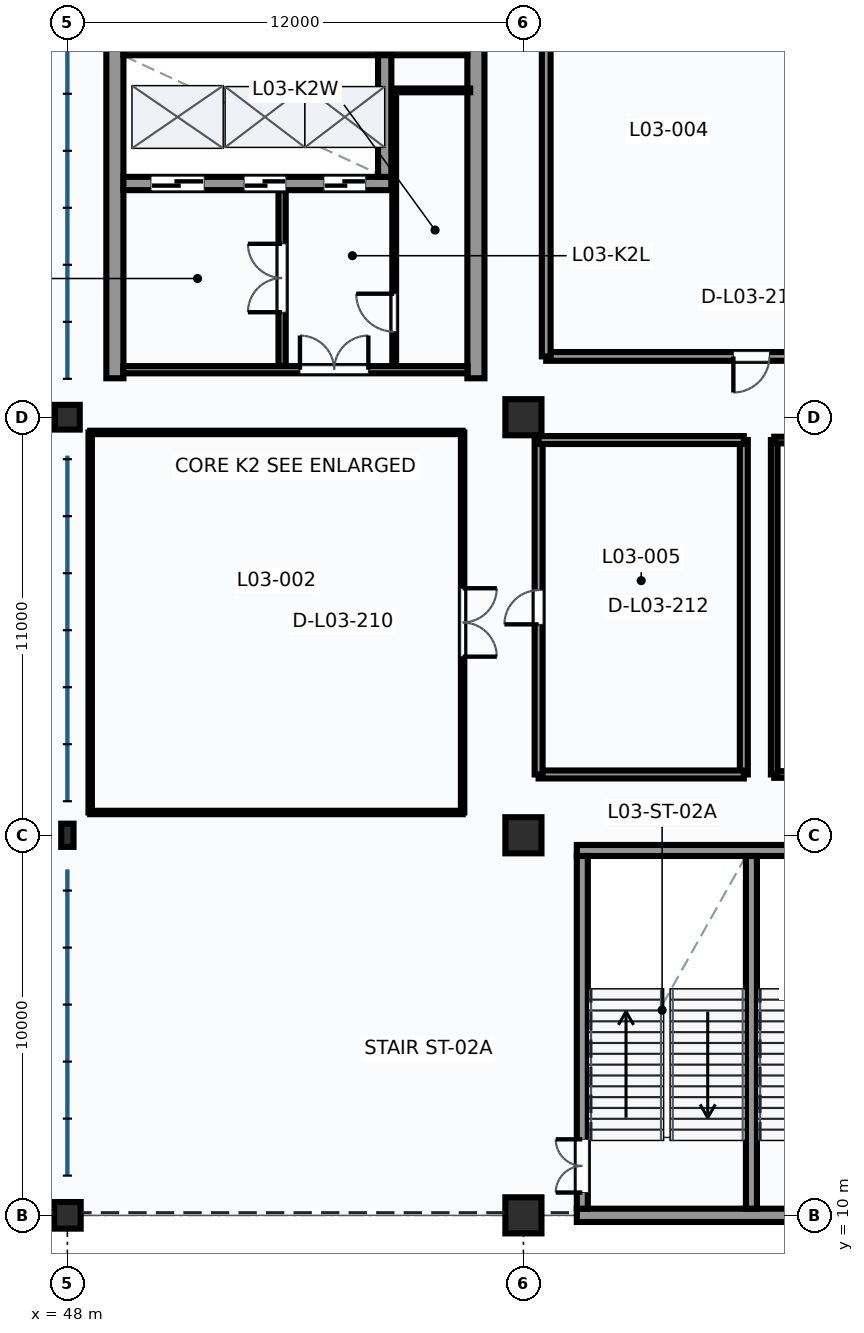
"""IFC4 building model, lengths in metres.
Left out: names, types, materials, properties, quantities, classifications, styles, units other than length and angle.
Written with IfcOpenShell. Run it as: python <this file> out.ifc"""

import sys

from ifc_helpers import new_model, si_unit, direction, frame, frame_2d, origin, origin_2d, place, context, subcontext, project, spatial, rectangle, i_section, extrude, element, fill, save


model = new_model("IFC4")
c1 = context("Model", 3, precision=1e-05, world=origin(), true_north=direction((0.0, 1.0)))
c2 = subcontext(c1, "Body", "Model", "MODEL_VIEW")
j1 = project(units=[si_unit("LENGTHUNIT", "METRE"), si_unit("PLANEANGLEUNIT", "RADIAN")], contexts=[c1])
p1 = place(None, origin())
s1 = spatial("IfcSite", under=j1, at=p1, CompositionType="ELEMENT")
p2 = place(p1, origin())
s2 = spatial("IfcBuilding", under=s1, at=p2, CompositionType="ELEMENT")
p3 = place(p2, frame((0.0, 0.0, 14.7)))
s3 = spatial("IfcBuildingStorey", under=s2, at=p3, CompositionType="ELEMENT", Elevation=14.7)
p4 = place(p3, frame((48.0, 10.0, 0.0), z_axis=(0.0, 0.0, 1.0), x_axis=(1.0, 0.0, 0.0)))
e1 = element("IfcColumn", 1, at=p4, inside=s3, PredefinedType="COLUMN", context=c2, shape_type="SweptSolid", body=[
    extrude(rectangle(XDim=0.7, YDim=0.7, at=origin_2d()), origin(), (0.0, 0.0, 1.0), 4.5),
])
p5 = place(p3, frame((48.0, 20.0, 0.0), z_axis=(0.0, 0.0, 1.0), x_axis=(1.0, 0.0, 0.0)))
e2 = element("IfcColumn", 2, at=p5, inside=s3, PredefinedType="COLUMN", context=c2, shape_type="SweptSolid", body=[
    extrude(i_section(OverallWidth=0.324, OverallDepth=0.611, WebThickness=0.013, FlangeThickness=0.019, FilletRadius=0.016, at=origin_2d()), origin(), (0.0, 0.0, 1.0), 4.5),
])
p6 = place(p3, frame((48.0, 31.0, 0.0), z_axis=(0.0, 0.0, 1.0), x_axis=(1.0, 0.0, 0.0)))
e3 = element("IfcColumn", 3, at=p6, inside=s3, PredefinedType="COLUMN", context=c2, shape_type="SweptSolid", body=[
    extrude(rectangle(XDim=0.65, YDim=0.65, at=origin_2d()), origin(), (0.0, 0.0, 1.0), 4.5),
])
for number, where, z_axis, x_axis in (
    (4, (60.0, 10.0, 0.0), (0.0, 0.0, 1.0), (1.0, 0.0, 0.0)),
    (5, (60.0, 20.0, 0.0), (0.0, 0.0, 1.0), (1.0, 0.0, 0.0)),
    (6, (60.0, 31.0, 0.0), (0.0, 0.0, 1.0), (1.0, 0.0, 0.0)),
):
    element("IfcColumn", number, at=place(p3, frame(where, z_axis=z_axis, x_axis=x_axis)), inside=s3, PredefinedType="COLUMN", context=c2, shape_type="SweptSolid", body=[
        extrude(rectangle(XDim=0.95, YDim=0.95, at=origin_2d()), origin(), (0.0, 0.0, 1.0), 4.5),
    ])
p7 = place(p3, frame((61.405, 10.0, 0.0), z_axis=(0.0, 0.0, 1.0), x_axis=(1.0, 0.0, 0.0)))
e7 = element("IfcWall", 7, at=p7, inside=s3, PredefinedType="SHEAR", context=c2, shape_type="SweptSolid", body=[
    extrude(rectangle(XDim=9.19, YDim=0.35, at=frame_2d((4.595, 0.0))), origin(), (0.0, 0.0, 1.0), 3.447),
])
p8 = place(p3, frame((61.405, 19.6, 0.0), z_axis=(0.0, 0.0, 1.0), x_axis=(1.0, 0.0, 0.0)))
e8 = element("IfcWall", 8, at=p8, inside=s3, PredefinedType="SHEAR", context=c2, shape_type="SweptSolid", body=[
    extrude(rectangle(XDim=9.19, YDim=0.29, at=frame_2d((4.595, 0.0))), origin(), (0.0, 0.0, 1.0), 4.5),
])
p9 = place(p3, frame((61.55, 10.175, 0.0), z_axis=(0.0, 0.0, 1.0), x_axis=(0.0, 1.0, 0.0)))
e9 = element("IfcWall", 9, at=p9, inside=s3, PredefinedType="SHEAR", context=c2, shape_type="SweptSolid", body=[
    extrude(rectangle(XDim=9.28, YDim=0.29, at=frame_2d((4.64, 0.0))), origin(), (0.0, 0.0, 1.0), 4.5),
])
p10 = place(p9, frame((0.425, 0.0, 0.0)))
e10 = element("IfcOpeningElement", 10, at=p10, cuts=e9, PredefinedType="OPENING", context=c2, shape_type="SweptSolid", body=[
    extrude(rectangle(XDim=1.4, YDim=2.2, at=frame_2d((0.7, 1.1))), frame((0.0, 0.155, 0.0), z_axis=(0.0, -1.0, 0.0), x_axis=(1.0, 0.0, 0.0)), (0.0, 0.0, 1.0), 0.31),
])
p11 = place(p3, frame((66.0, 10.175, 0.0), z_axis=(0.0, 0.0, 1.0), x_axis=(0.0, 1.0, 0.0)))
e11 = element("IfcWall", 11, at=p11, inside=s3, PredefinedType="SHEAR", context=c2, shape_type="SweptSolid", body=[
    extrude(rectangle(XDim=9.28, YDim=0.29, at=frame_2d((4.64, 0.0))), origin(), (0.0, 0.0, 1.0), 4.5),
])
for number, where, z_axis, x_axis in (
    (12, (49.25, 32.025, 0.0), (0.0, 0.0, 1.0), (0.0, 1.0, 0.0)),
    (13, (58.75, 32.025, 0.0), (0.0, 0.0, 1.0), (0.0, 1.0, 0.0)),
):
    element("IfcWall", number, at=place(p3, frame(where, z_axis=z_axis, x_axis=x_axis)), inside=s3, PredefinedType="SHEAR", context=c2, shape_type="SweptSolid", body=[
        extrude(rectangle(XDim=8.95, YDim=0.45, at=frame_2d((4.475, 0.0))), origin(), (0.0, 0.0, 1.0), 4.5),
    ])
p12 = place(p3, frame((49.475, 40.75, 0.0), z_axis=(0.0, 0.0, 1.0), x_axis=(1.0, 0.0, 0.0)))
e14 = element("IfcWall", 14, at=p12, inside=s3, PredefinedType="SHEAR", context=c2, shape_type="SweptSolid", body=[
    extrude(rectangle(XDim=9.05, YDim=0.45, at=frame_2d((4.525, 0.0))), origin(), (0.0, 0.0, 1.0), 4.5),
])
p13 = place(p3, frame((49.475, 37.15, 0.0), z_axis=(0.0, 0.0, 1.0), x_axis=(1.0, 0.0, 0.0)))
e15 = element("IfcWall", 15, at=p13, inside=s3, PredefinedType="SHEAR", context=c2, shape_type="SweptSolid", body=[
    extrude(rectangle(XDim=7.05, YDim=0.35, at=frame_2d((3.525, 0.0))), origin(), (0.0, 0.0, 1.0), 4.5),
])
p14 = place(p13, frame((0.725, 0.0, 0.0)))
e16 = element("IfcOpeningElement", 16, at=p14, cuts=e15, PredefinedType="OPENING", context=c2, shape_type="SweptSolid", body=[
    extrude(rectangle(XDim=1.4, YDim=2.3, at=frame_2d((0.7, 1.15))), frame((0.0, 0.185, 0.0), z_axis=(0.0, -1.0, 0.0), x_axis=(1.0, 0.0, 0.0)), (0.0, 0.0, 1.0), 0.37),
])
p15 = place(p13, frame((3.175, 0.0, 0.0)))
e17 = element("IfcOpeningElement", 17, at=p15, cuts=e15, PredefinedType="OPENING", context=c2, shape_type="SweptSolid", body=[
    extrude(rectangle(XDim=1.1, YDim=2.2, at=frame_2d((0.55, 1.1))), frame((0.0, 0.185, 0.0), z_axis=(0.0, -1.0, 0.0), x_axis=(1.0, 0.0, 0.0)), (0.0, 0.0, 1.0), 0.37),
])
p16 = place(p13, frame((5.275, 0.0, 0.0)))
e18 = element("IfcOpeningElement", 18, at=p16, cuts=e15, PredefinedType="OPENING", context=c2, shape_type="SweptSolid", body=[
    extrude(rectangle(XDim=1.1, YDim=2.2, at=frame_2d((0.55, 1.1))), frame((0.0, 0.185, 0.0), z_axis=(0.0, -1.0, 0.0), x_axis=(1.0, 0.0, 0.0)), (0.0, 0.0, 1.0), 0.37),
])
p17 = place(p3, frame((56.35, 37.325, 0.0), z_axis=(0.0, 0.0, 1.0), x_axis=(0.0, 1.0, 0.0)))
e19 = element("IfcWall", 19, at=p17, inside=s3, PredefinedType="SHEAR", context=c2, shape_type="SweptSolid", body=[
    extrude(rectangle(XDim=3.2, YDim=0.35, at=frame_2d((1.6, 0.0))), origin(), (0.0, 0.0, 1.0), 4.5),
])
p18 = place(p3, frame((49.47, 32.25, 0.0), z_axis=(0.0, 0.0, 1.0), x_axis=(1.0, 0.0, 0.0)))
e20 = element("IfcWall", 20, at=p18, inside=s3, PredefinedType="PARTITIONING", context=c2, shape_type="SweptSolid", body=[
    extrude(rectangle(XDim=9.06, YDim=0.19, at=frame_2d((4.53, 0.0))), origin(), (0.0, 0.0, 1.0), 4.16),
])
p19 = place(p18, frame((4.65, 0.0, 0.0)))
e21 = element("IfcOpeningElement", 21, at=p19, cuts=e20, PredefinedType="OPENING", context=c2, shape_type="SweptSolid", body=[
    extrude(rectangle(XDim=1.8, YDim=2.3, at=frame_2d((0.9, 1.15))), frame((0.0, 0.105, 0.0), z_axis=(0.0, -1.0, 0.0), x_axis=(1.0, 0.0, 0.0)), (0.0, 0.0, 1.0), 0.21),
])
p20 = place(p3, frame((53.65, 32.35, 0.0), z_axis=(0.0, 0.0, 1.0), x_axis=(0.0, 1.0, 0.0)))
e22 = element("IfcWall", 22, at=p20, inside=s3, PredefinedType="PARTITIONING", context=c2, shape_type="SweptSolid", body=[
    extrude(rectangle(XDim=4.625, YDim=0.19, at=frame_2d((2.312, 0.0))), origin(), (0.0, 0.0, 1.0), 4.16),
])
p21 = place(p20, frame((1.413, 0.0, 0.0)))
e23 = element("IfcOpeningElement", 23, at=p21, cuts=e22, PredefinedType="OPENING", context=c2, shape_type="SweptSolid", body=[
    extrude(rectangle(XDim=1.8, YDim=2.2, at=frame_2d((0.9, 1.1))), frame((0.0, 0.105, 0.0), z_axis=(0.0, -1.0, 0.0), x_axis=(1.0, 0.0, 0.0)), (0.0, 0.0, 1.0), 0.21),
])
p22 = place(p3, frame((56.6, 32.35, 0.0), z_axis=(0.0, 0.0, 1.0), x_axis=(0.0, 1.0, 0.0)))
e24 = element("IfcWall", 24, at=p22, inside=s3, PredefinedType="PARTITIONING", context=c2, shape_type="SweptSolid", body=[
    extrude(rectangle(XDim=7.25, YDim=0.1, at=frame_2d((3.625, 0.0))), origin(), (0.0, 0.0, 1.0), 4.16),
])
p23 = place(p22, frame((0.9, 0.0, 0.0)))
e25 = element("IfcOpeningElement", 25, at=p23, cuts=e24, PredefinedType="OPENING", context=c2, shape_type="SweptSolid", body=[
    extrude(rectangle(XDim=1.0, YDim=2.1, at=frame_2d((0.5, 1.05))), frame((0.0, 0.06, 0.0), z_axis=(0.0, -1.0, 0.0), x_axis=(1.0, 0.0, 0.0)), (0.0, 0.0, 1.0), 0.12),
])
p24 = place(p3, frame((56.6, 39.6, 0.0), z_axis=(0.0, 0.0, 1.0), x_axis=(1.0, 0.0, 0.0)))
e26 = element("IfcWall", 26, at=p24, inside=s3, PredefinedType="PARTITIONING", context=c2, shape_type="SweptSolid", body=[
    extrude(rectangle(XDim=2.0, YDim=0.1, at=frame_2d((1.0, 0.0))), origin(), (0.0, 0.0, 1.0), 4.16),
])
p25 = place(p3, frame((58.4, 30.6, 0.0), z_axis=(0.0, 0.0, 1.0), x_axis=(0.0, -1.0, 0.0)))
e27 = element("IfcWall", 27, at=p25, inside=s3, PredefinedType="PARTITIONING", context=c2, shape_type="SweptSolid", body=[
    extrude(rectangle(XDim=10.0, YDim=0.09, at=frame_2d((5.0, 0.0))), origin(), (0.0, 0.0, 1.0), 3.73),
])
p26 = place(p25, frame((4.1, 0.0, 0.0)))
e28 = element("IfcOpeningElement", 28, at=p26, cuts=e27, PredefinedType="OPENING", context=c2, shape_type="SweptSolid", body=[
    extrude(rectangle(XDim=1.8, YDim=2.3, at=frame_2d((0.9, 1.15))), frame((0.0, 0.055, 0.0), z_axis=(0.0, -1.0, 0.0), x_axis=(1.0, 0.0, 0.0)), (0.0, 0.0, 1.0), 0.11),
])
p27 = place(p3, frame((58.4, 20.6, 0.0), z_axis=(0.0, 0.0, 1.0), x_axis=(-1.0, 0.0, 0.0)))
e29 = element("IfcWall", 29, at=p27, inside=s3, PredefinedType="PARTITIONING", context=c2, shape_type="SweptSolid", body=[
    extrude(rectangle(XDim=9.8, YDim=0.09, at=frame_2d((4.9, 0.0))), origin(), (0.0, 0.0, 1.0), 4.16),
])
p28 = place(p3, frame((48.6, 20.6, 0.0), z_axis=(0.0, 0.0, 1.0), x_axis=(0.0, 1.0, 0.0)))
e30 = element("IfcWall", 30, at=p28, inside=s3, PredefinedType="PARTITIONING", context=c2, shape_type="SweptSolid", body=[
    extrude(rectangle(XDim=10.0, YDim=0.09, at=frame_2d((5.0, 0.0))), origin(), (0.0, 0.0, 1.0), 3.73),
])
p29 = place(p3, frame((48.6, 30.6, 0.0), z_axis=(0.0, 0.0, 1.0), x_axis=(1.0, 0.0, 0.0)))
e31 = element("IfcWall", 31, at=p29, inside=s3, PredefinedType="PARTITIONING", context=c2, shape_type="SweptSolid", body=[
    extrude(rectangle(XDim=9.8, YDim=0.09, at=frame_2d((4.9, 0.0))), origin(), (0.0, 0.0, 1.0), 4.16),
])
p30 = place(p3, frame((71.4, 32.6, 0.0), z_axis=(0.0, 0.0, 1.0), x_axis=(-1.0, 0.0, 0.0)))
e32 = element("IfcWall", 32, at=p30, inside=s3, PredefinedType="SOLIDWALL", context=c2, shape_type="SweptSolid", body=[
    extrude(rectangle(XDim=10.8, YDim=0.23, at=frame_2d((5.4, 0.0))), origin(), (0.0, 0.0, 1.0), 4.16),
])
p31 = place(p30, frame((4.925, 0.0, 0.0)))
e33 = element("IfcOpeningElement", 33, at=p31, cuts=e32, PredefinedType="OPENING", context=c2, shape_type="SweptSolid", body=[
    extrude(rectangle(XDim=0.95, YDim=2.15, at=frame_2d((0.475, 1.075))), frame((0.0, 0.125, 0.0), z_axis=(0.0, -1.0, 0.0), x_axis=(1.0, 0.0, 0.0)), (0.0, 0.0, 1.0), 0.25),
])
p32 = place(p3, frame((60.6, 32.6, 0.0), z_axis=(0.0, 0.0, 1.0), x_axis=(0.0, 1.0, 0.0)))
e34 = element("IfcWall", 34, at=p32, inside=s3, PredefinedType="SOLIDWALL", context=c2, shape_type="SweptSolid", body=[
    extrude(rectangle(XDim=8.8, YDim=0.23, at=frame_2d((4.4, 0.0))), origin(), (0.0, 0.0, 1.0), 4.16),
])
p33 = place(p3, frame((65.8, 30.4, 0.0), z_axis=(0.0, 0.0, 1.0), x_axis=(0.0, -1.0, 0.0)))
e35 = element("IfcWall", 35, at=p33, inside=s3, PredefinedType="SOLIDWALL", context=c2, shape_type="SweptSolid", body=[
    extrude(rectangle(XDim=8.8, YDim=0.21, at=frame_2d((4.4, 0.0))), origin(), (0.0, 0.0, 1.0), 3.83),
])
p34 = place(p3, frame((65.8, 21.6, 0.0), z_axis=(0.0, 0.0, 1.0), x_axis=(-1.0, 0.0, 0.0)))
e36 = element("IfcWall", 36, at=p34, inside=s3, PredefinedType="SOLIDWALL", context=c2, shape_type="SweptSolid", body=[
    extrude(rectangle(XDim=5.4, YDim=0.21, at=frame_2d((2.7, 0.0))), origin(), (0.0, 0.0, 1.0), 4.16),
])
p35 = place(p3, frame((60.4, 21.6, 0.0), z_axis=(0.0, 0.0, 1.0), x_axis=(0.0, 1.0, 0.0)))
e37 = element("IfcWall", 37, at=p35, inside=s3, PredefinedType="SOLIDWALL", context=c2, shape_type="SweptSolid", body=[
    extrude(rectangle(XDim=8.8, YDim=0.21, at=frame_2d((4.4, 0.0))), origin(), (0.0, 0.0, 1.0), 3.83),
])
p36 = place(p35, frame((3.95, 0.0, 0.0)))
e38 = element("IfcOpeningElement", 38, at=p36, cuts=e37, PredefinedType="OPENING", context=c2, shape_type="SweptSolid", body=[
    extrude(rectangle(XDim=0.9, YDim=2.1, at=frame_2d((0.45, 1.05))), frame((0.0, 0.115, 0.0), z_axis=(0.0, -1.0, 0.0), x_axis=(1.0, 0.0, 0.0)), (0.0, 0.0, 1.0), 0.23),
])
p37 = place(p3, frame((60.4, 30.4, 0.0), z_axis=(0.0, 0.0, 1.0), x_axis=(1.0, 0.0, 0.0)))
e39 = element("IfcWall", 39, at=p37, inside=s3, PredefinedType="SOLIDWALL", context=c2, shape_type="SweptSolid", body=[
    extrude(rectangle(XDim=5.4, YDim=0.21, at=frame_2d((2.7, 0.0))), origin(), (0.0, 0.0, 1.0), 4.16),
])
p38 = place(p3, frame((72.0, 21.6, 0.0), z_axis=(0.0, 0.0, 1.0), x_axis=(-1.0, 0.0, 0.0)))
e40 = element("IfcWall", 40, at=p38, inside=s3, PredefinedType="PARTITIONING", context=c2, shape_type="SweptSolid", body=[
    extrude(rectangle(XDim=5.4, YDim=0.175, at=frame_2d((2.7, 0.0))), origin(), (0.0, 0.0, 1.0), 3.37),
])
p39 = place(p3, frame((66.6, 21.6, 0.0), z_axis=(0.0, 0.0, 1.0), x_axis=(0.0, 1.0, 0.0)))
e41 = element("IfcWall", 41, at=p39, inside=s3, PredefinedType="PARTITIONING", context=c2, shape_type="SweptSolid", body=[
    extrude(rectangle(XDim=8.8, YDim=0.175, at=frame_2d((4.4, 0.0))), origin(), (0.0, 0.0, 1.0), 3.83),
])
p40 = place(p3, frame((66.6, 30.4, 0.0), z_axis=(0.0, 0.0, 1.0), x_axis=(1.0, 0.0, 0.0)))
e42 = element("IfcWall", 42, at=p40, inside=s3, PredefinedType="PARTITIONING", context=c2, shape_type="SweptSolid", body=[
    extrude(rectangle(XDim=5.253, YDim=0.175, at=frame_2d((2.626, 0.0))), origin(), (0.0, 0.0, 1.0), 3.37),
])
p41 = place(p10, frame((1.4, 0.0, 0.0), z_axis=(0.0, 0.0, 1.0), x_axis=(-1.0, 0.0, 0.0)))
e43 = element("IfcDoor", 43, at=p41, inside=s3, OperationType="DOUBLE_DOOR_SINGLE_SWING", PredefinedType="DOOR", context=c2, shape_type="SweptSolid", body=[
    extrude(rectangle(XDim=1.4, YDim=2.2, at=frame_2d((0.7, 1.1))), frame((0.0, 0.025, 0.0), z_axis=(0.0, -1.0, 0.0), x_axis=(1.0, 0.0, 0.0)), (0.0, 0.0, 1.0), 0.05),
])
fill(e10, e43)
p42 = place(p14, origin())
e44 = element("IfcDoor", 44, at=p42, inside=s3, OperationType="SLIDING_TO_LEFT", PredefinedType="DOOR", context=c2, shape_type="SweptSolid", body=[
    extrude(rectangle(XDim=1.4, YDim=2.3, at=frame_2d((0.7, 1.15))), frame((0.0, 0.025, 0.0), z_axis=(0.0, -1.0, 0.0), x_axis=(1.0, 0.0, 0.0)), (0.0, 0.0, 1.0), 0.05),
])
fill(e16, e44)
p43 = place(p15, origin())
e45 = element("IfcDoor", 45, at=p43, inside=s3, OperationType="SLIDING_TO_LEFT", PredefinedType="DOOR", context=c2, shape_type="SweptSolid", body=[
    extrude(rectangle(XDim=1.1, YDim=2.2, at=frame_2d((0.55, 1.1))), frame((0.0, 0.025, 0.0), z_axis=(0.0, -1.0, 0.0), x_axis=(1.0, 0.0, 0.0)), (0.0, 0.0, 1.0), 0.05),
])
fill(e17, e45)
p44 = place(p16, origin())
e46 = element("IfcDoor", 46, at=p44, inside=s3, OperationType="SLIDING_TO_LEFT", PredefinedType="DOOR", context=c2, shape_type="SweptSolid", body=[
    extrude(rectangle(XDim=1.1, YDim=2.2, at=frame_2d((0.55, 1.1))), frame((0.0, 0.025, 0.0), z_axis=(0.0, -1.0, 0.0), x_axis=(1.0, 0.0, 0.0)), (0.0, 0.0, 1.0), 0.05),
])
fill(e18, e46)
p45 = place(p19, origin())
e47 = element("IfcDoor", 47, at=p45, inside=s3, OperationType="DOUBLE_DOOR_SINGLE_SWING", PredefinedType="DOOR", context=c2, shape_type="SweptSolid", body=[
    extrude(rectangle(XDim=1.8, YDim=2.3, at=frame_2d((0.9, 1.15))), frame((0.0, 0.025, 0.0), z_axis=(0.0, -1.0, 0.0), x_axis=(1.0, 0.0, 0.0)), (0.0, 0.0, 1.0), 0.05),
])
fill(e21, e47)
p46 = place(p21, origin())
e48 = element("IfcDoor", 48, at=p46, inside=s3, OperationType="DOUBLE_DOOR_SINGLE_SWING", PredefinedType="DOOR", context=c2, shape_type="SweptSolid", body=[
    extrude(rectangle(XDim=1.8, YDim=2.2, at=frame_2d((0.9, 1.1))), frame((0.0, 0.025, 0.0), z_axis=(0.0, -1.0, 0.0), x_axis=(1.0, 0.0, 0.0)), (0.0, 0.0, 1.0), 0.05),
])
fill(e23, e48)
p47 = place(p23, origin())
e49 = element("IfcDoor", 49, at=p47, inside=s3, OperationType="SINGLE_SWING_RIGHT", PredefinedType="DOOR", context=c2, shape_type="SweptSolid", body=[
    extrude(rectangle(XDim=1.0, YDim=2.1, at=frame_2d((0.5, 1.05))), frame((0.0, 0.025, 0.0), z_axis=(0.0, -1.0, 0.0), x_axis=(1.0, 0.0, 0.0)), (0.0, 0.0, 1.0), 0.05),
])
fill(e25, e49)
p48 = place(p26, origin())
e50 = element("IfcDoor", 50, at=p48, inside=s3, OperationType="DOUBLE_DOOR_SINGLE_SWING", PredefinedType="DOOR", context=c2, shape_type="SweptSolid", body=[
    extrude(rectangle(XDim=1.8, YDim=2.3, at=frame_2d((0.9, 1.15))), frame((0.0, 0.025, 0.0), z_axis=(0.0, -1.0, 0.0), x_axis=(1.0, 0.0, 0.0)), (0.0, 0.0, 1.0), 0.05),
])
fill(e28, e50)
p49 = place(p31, origin())
e51 = element("IfcDoor", 51, at=p49, inside=s3, OperationType="SINGLE_SWING_RIGHT", PredefinedType="DOOR", context=c2, shape_type="SweptSolid", body=[
    extrude(rectangle(XDim=0.95, YDim=2.15, at=frame_2d((0.475, 1.075))), frame((0.0, 0.025, 0.0), z_axis=(0.0, -1.0, 0.0), x_axis=(1.0, 0.0, 0.0)), (0.0, 0.0, 1.0), 0.05),
])
fill(e33, e51)
p50 = place(p36, origin())
e52 = element("IfcDoor", 52, at=p50, inside=s3, OperationType="SINGLE_SWING_LEFT", PredefinedType="DOOR", context=c2, shape_type="SweptSolid", body=[
    extrude(rectangle(XDim=0.9, YDim=2.1, at=frame_2d((0.45, 1.05))), frame((0.0, 0.025, 0.0), z_axis=(0.0, -1.0, 0.0), x_axis=(1.0, 0.0, 0.0)), (0.0, 0.0, 1.0), 0.05),
])
fill(e38, e52)
save(model, sys.argv[1])
